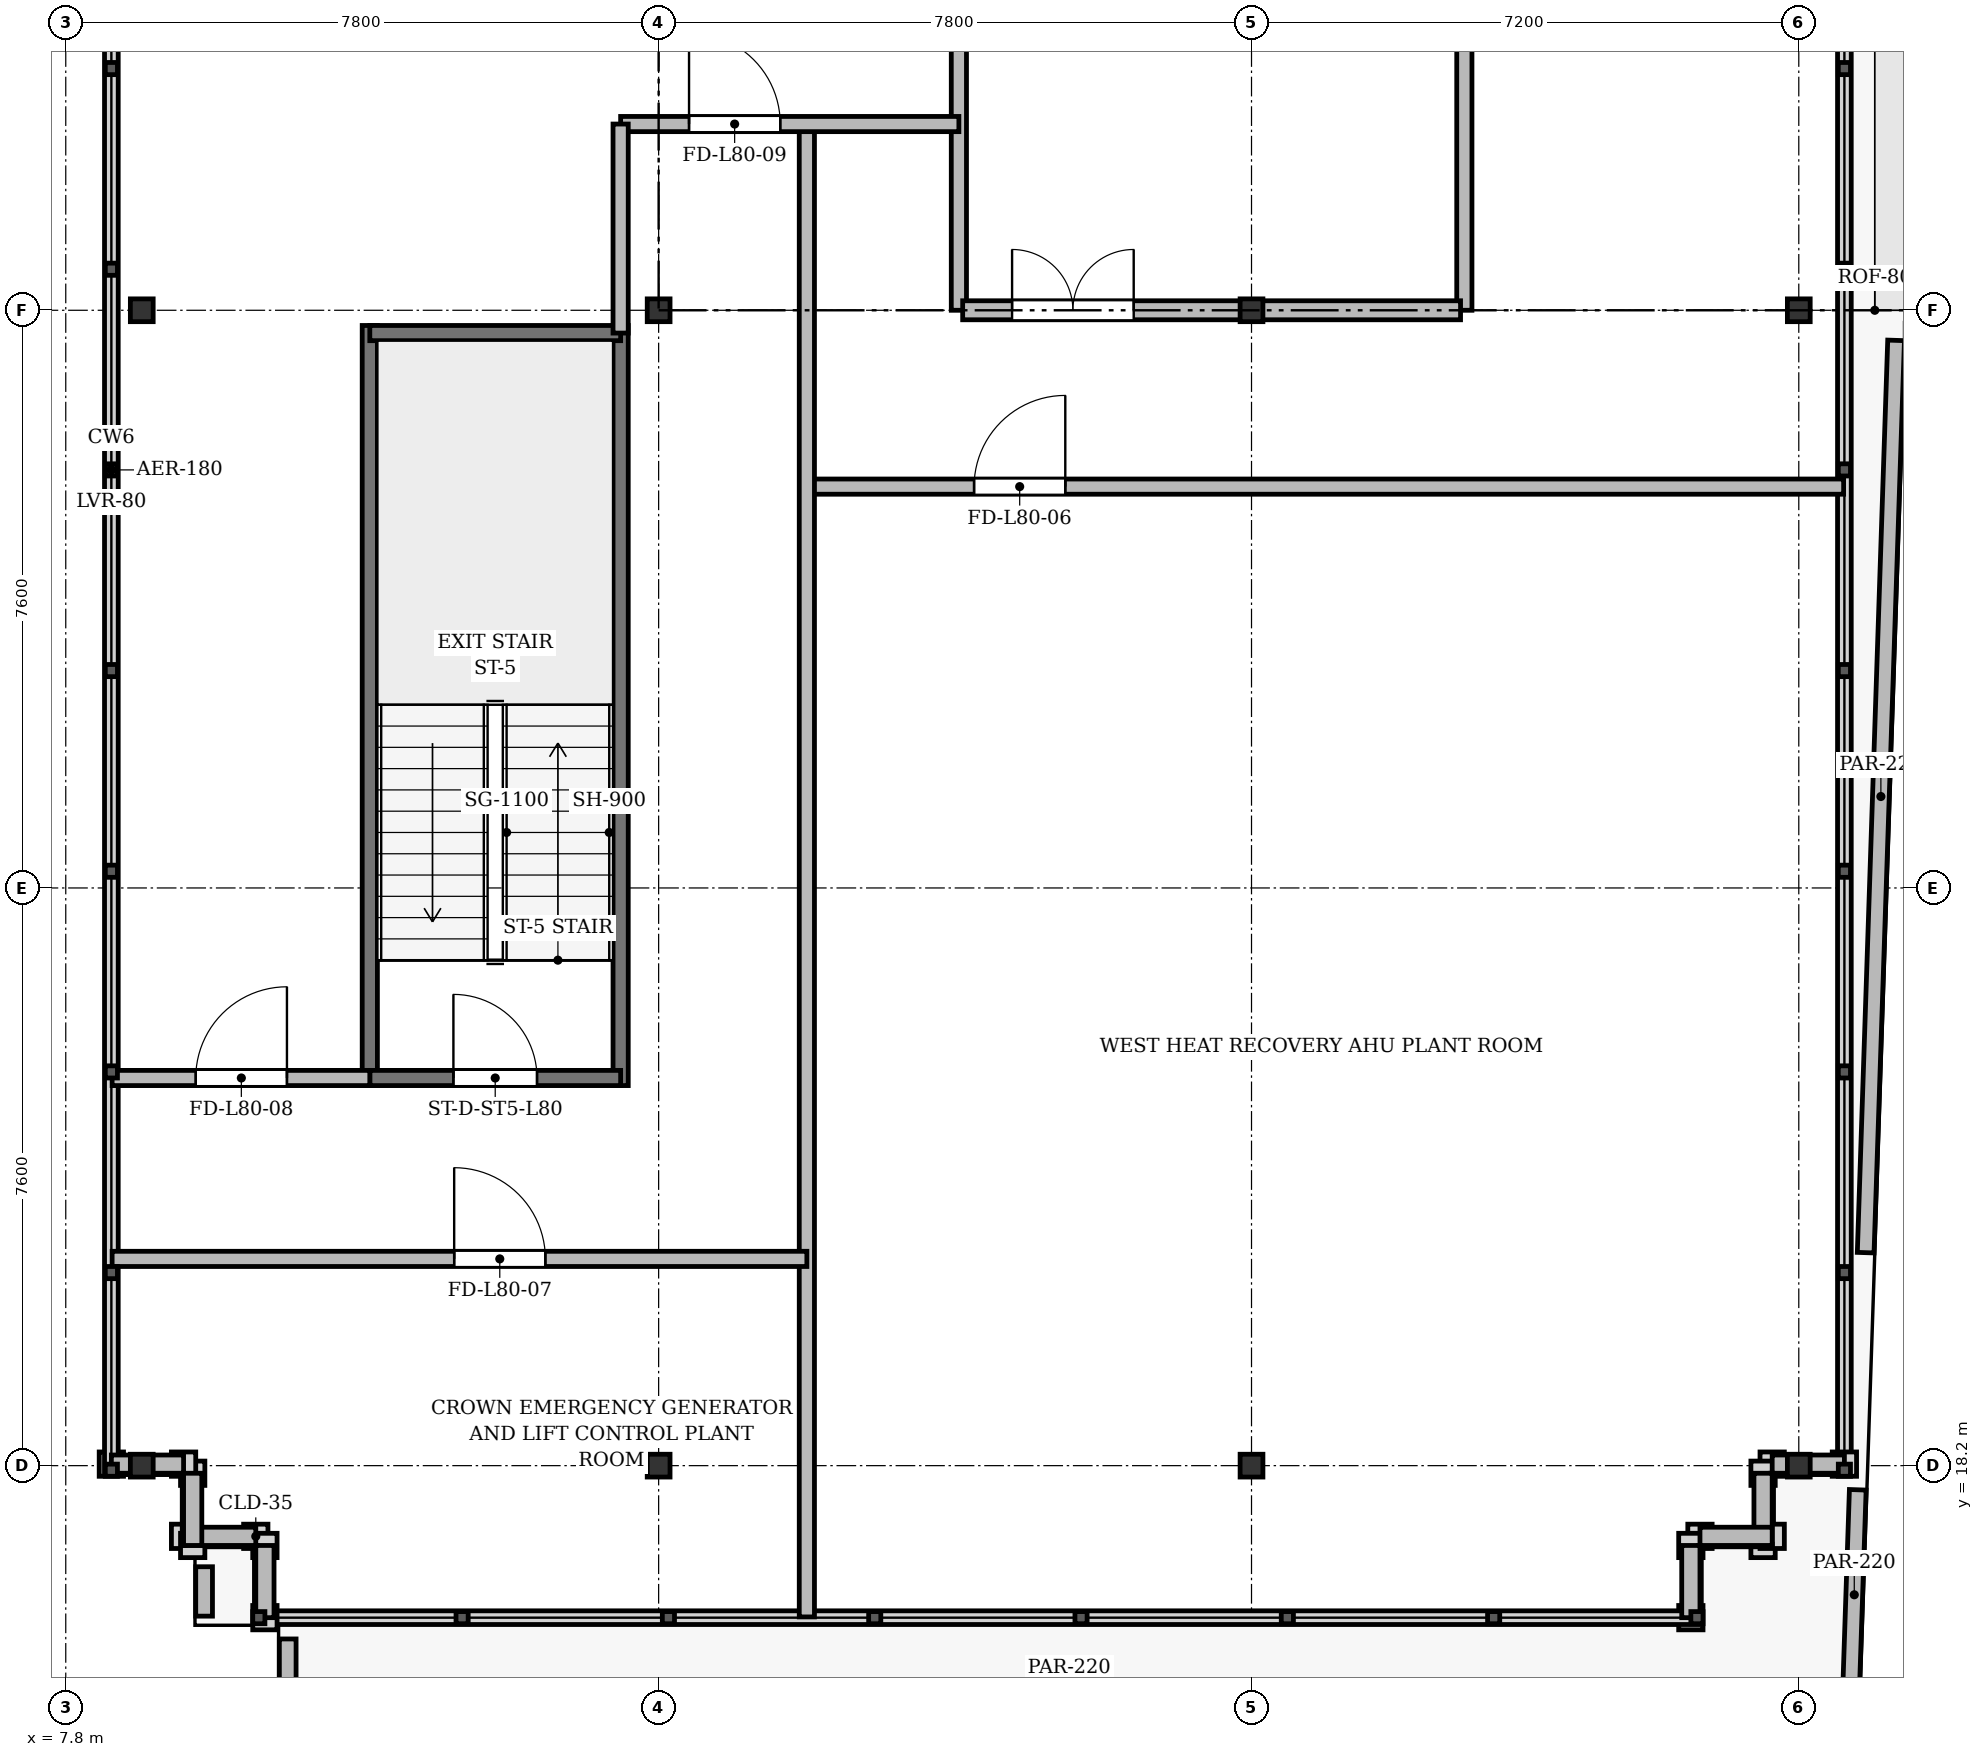
"""IFC4 building model, lengths in metres.
Left out: names, types, materials, properties, quantities, classifications, styles, units other than length and angle.
Written with IfcOpenShell. Run it as: python <this file> out.ifc"""

import sys

from ifc_helpers import new_model, si_unit, direction, frame, frame_2d, origin, origin_2d, place, context, subcontext, project, spatial, rectangle, i_section, extrude, source, transform, mapped, element, fill, save


model = new_model("IFC4")
c1 = context("Model", 3, precision=1e-05, world=origin(), true_north=direction((0.0, 1.0)))
c2 = subcontext(c1, "Body", "Model", "MODEL_VIEW")
j1 = project(units=[si_unit("LENGTHUNIT", "METRE"), si_unit("PLANEANGLEUNIT", "RADIAN")], contexts=[c1])
p1 = place(None, origin())
s1 = spatial("IfcSite", under=j1, at=p1, CompositionType="ELEMENT")
p2 = place(p1, origin())
s2 = spatial("IfcBuilding", under=s1, at=p2, CompositionType="ELEMENT")
p3 = place(p2, frame((0.0, 0.0, 307.9)))
s3 = spatial("IfcBuildingStorey", under=s2, at=p3, CompositionType="ELEMENT", Elevation=307.9)
m1 = source(origin(), c2, "Body", "SweptSolid", [
    extrude(i_section(OverallWidth=0.3, OverallDepth=0.3, WebThickness=0.015, FlangeThickness=0.024, at=origin_2d()), origin(), (0.0, 0.0, 1.0), 4.4),
])
for number, where, z_axis, x_axis in (
    (1, (8.8, 18.2, 0.0), (0.0, 0.0, 1.0), (1.0, 0.0, 0.0)),
    (2, (8.8, 33.4, 0.0), (0.0, 0.0, 1.0), (1.0, 0.0, 0.0)),
    (3, (15.6, 18.2, 0.0), (0.0, 0.0, 1.0), (1.0, 0.0, 0.0)),
    (4, (15.6, 33.4, 0.0), (0.0, 0.0, 1.0), (1.0, 0.0, 0.0)),
    (5, (23.4, 18.2, 0.0), (0.0, 0.0, 1.0), (1.0, 0.0, 0.0)),
    (6, (23.4, 33.4, 0.0), (0.0, 0.0, 1.0), (1.0, 0.0, 0.0)),
    (7, (30.6, 18.2, 0.0), (0.0, 0.0, 1.0), (1.0, 0.0, 0.0)),
    (8, (30.6, 33.4, 0.0), (0.0, 0.0, 1.0), (1.0, 0.0, 0.0)),
):
    element("IfcColumn", number, at=place(p3, frame(where, z_axis=z_axis, x_axis=x_axis)), inside=s3, PredefinedType="COLUMN", context=c2, shape_type="MappedRepresentation", body=[
        mapped(m1, transform((0.0, 0.0, 0.0), x_axis=(1.0, 0.0, 0.0), y_axis=(0.0, 1.0, 0.0), z_axis=(0.0, 0.0, 1.0), scale=1.0)),
    ])
p4 = place(p3, frame((10.3, 17.27, 0.0), z_axis=(0.0, 0.0, 1.0), x_axis=(-1.0, 0.0, 0.0)))
e9 = element("IfcWall", 9, at=p4, inside=s3, PredefinedType="SOLIDWALL", context=c2, shape_type="SweptSolid", body=[
    extrude(rectangle(XDim=0.95, YDim=0.24, at=frame_2d((0.475, 0.0))), origin(), (0.0, 0.0, 1.0), 4.1),
])
p5 = place(p3, frame((9.47, 17.15, 0.0), z_axis=(0.0, 0.0, 1.0), x_axis=(0.0, 1.0, 0.0)))
e10 = element("IfcWall", 10, at=p5, inside=s3, PredefinedType="SOLIDWALL", context=c2, shape_type="SweptSolid", body=[
    extrude(rectangle(XDim=0.95, YDim=0.24, at=frame_2d((0.475, 0.0))), origin(), (0.0, 0.0, 1.0), 4.1),
])
p6 = place(p3, frame((9.35, 18.22, 0.0), z_axis=(0.0, 0.0, 1.0), x_axis=(-1.0, 0.0, 0.0)))
e11 = element("IfcWall", 11, at=p6, inside=s3, PredefinedType="SOLIDWALL", context=c2, shape_type="SweptSolid", body=[
    extrude(rectangle(XDim=0.95, YDim=0.24, at=frame_2d((0.475, 0.0))), origin(), (0.0, 0.0, 1.0), 3.6),
])
p7 = place(p3, frame((31.2, 18.22, 0.0), z_axis=(0.0, 0.0, 1.0), x_axis=(-1.0, 0.0, 0.0)))
e12 = element("IfcWall", 12, at=p7, inside=s3, PredefinedType="SOLIDWALL", context=c2, shape_type="SweptSolid", body=[
    extrude(rectangle(XDim=0.95, YDim=0.24, at=frame_2d((0.475, 0.0))), origin(), (0.0, 0.0, 1.0), 4.1),
])
p8 = place(p3, frame((30.13, 18.1, 0.0), z_axis=(0.0, 0.0, 1.0), x_axis=(0.0, -1.0, 0.0)))
e13 = element("IfcWall", 13, at=p8, inside=s3, PredefinedType="SOLIDWALL", context=c2, shape_type="SweptSolid", body=[
    extrude(rectangle(XDim=0.95, YDim=0.24, at=frame_2d((0.475, 0.0))), origin(), (0.0, 0.0, 1.0), 4.1),
])
for number, where, z_axis, x_axis in (
    (14, (30.25, 17.27, 0.0), (0.0, 0.0, 1.0), (-1.0, 0.0, 0.0)),
    (15, (29.18, 17.15, 0.0), (0.0, 0.0, 1.0), (0.0, -1.0, 0.0)),
    (16, (10.42, 16.2, 0.0), (0.0, 0.0, 1.0), (0.0, 1.0, 0.0)),
):
    element("IfcWall", number, at=place(p3, frame(where, z_axis=z_axis, x_axis=x_axis)), inside=s3, PredefinedType="SOLIDWALL", context=c2, shape_type="SweptSolid", body=[
        extrude(rectangle(XDim=0.95, YDim=0.24, at=frame_2d((0.475, 0.0))), origin(), (0.0, 0.0, 1.0), 4.1),
    ])
p9 = place(p3, frame((9.62, 16.22, 0.0), z_axis=(0.0, 0.0, 1.0), x_axis=(0.0, 1.0, 0.0)))
e17 = element("IfcWall", 17, at=p9, inside=s3, PredefinedType="PARAPET", context=c2, shape_type="SweptSolid", body=[
    extrude(rectangle(XDim=0.65, YDim=0.22, at=frame_2d((0.325, 0.0))), origin(), (0.0, 0.0, 1.0), 1.08),
])
p10 = place(p3, frame((31.88, 33.004, 0.0), z_axis=(0.0, 0.0, 1.0), x_axis=(-0.033321599525, -0.999444681313, 0.0)))
e18 = element("IfcWall", 18, at=p10, inside=s3, PredefinedType="PARAPET", context=c2, shape_type="SweptSolid", body=[
    extrude(rectangle(XDim=12.009, YDim=0.22, at=frame_2d((6.004, 0.0))), origin(), (0.0, 0.0, 1.0), 1.08),
])
p11 = place(p3, frame((31.376, 17.882, 0.0), z_axis=(0.0, 0.0, 1.0), x_axis=(-0.03330306503, -0.999445299083, 0.0)))
e19 = element("IfcWall", 19, at=p11, inside=s3, PredefinedType="PARAPET", context=c2, shape_type="SweptSolid", body=[
    extrude(rectangle(XDim=2.764, YDim=0.22, at=frame_2d((1.382, 0.0))), origin(), (0.0, 0.0, 1.0), 1.08),
])
p12 = place(p3, frame((10.72, 15.12, 0.0), z_axis=(0.0, 0.0, 1.0), x_axis=(0.0, 1.0, 0.0)))
e20 = element("IfcWall", 20, at=p12, inside=s3, PredefinedType="PARAPET", context=c2, shape_type="SweptSolid", body=[
    extrude(rectangle(XDim=0.8, YDim=0.22, at=frame_2d((0.4, 0.0))), origin(), (0.0, 0.0, 1.0), 1.08),
])
for number, where, z_axis, x_axis in (
    (21, (11.8, 23.2, 0.0), (0.0, 0.0, 1.0), (0.0, 1.0, 0.0)),
    (22, (15.1, 23.2, 0.0), (0.0, 0.0, 1.0), (0.0, 1.0, 0.0)),
):
    element("IfcWall", number, at=place(p3, frame(where, z_axis=z_axis, x_axis=x_axis)), inside=s3, PredefinedType="SHEAR", context=c2, shape_type="SweptSolid", body=[
        extrude(rectangle(XDim=10.0, YDim=0.2, at=frame_2d((5.0, 0.0))), origin(), (0.0, 0.0, 1.0), 4.1),
    ])
p13 = place(p3, frame((11.8, 33.1, 0.0), z_axis=(0.0, 0.0, 1.0), x_axis=(1.0, 0.0, 0.0)))
e23 = element("IfcWall", 23, at=p13, inside=s3, PredefinedType="SHEAR", context=c2, shape_type="SweptSolid", body=[
    extrude(rectangle(XDim=3.3, YDim=0.2, at=frame_2d((1.65, 0.0))), origin(), (0.0, 0.0, 1.0), 4.1),
])
p14 = place(p3, frame((11.8, 23.3, 0.0), z_axis=(0.0, 0.0, 1.0), x_axis=(1.0, 0.0, 0.0)))
e24 = element("IfcWall", 24, at=p14, inside=s3, PredefinedType="SHEAR", context=c2, shape_type="SweptSolid", body=[
    extrude(rectangle(XDim=3.3, YDim=0.2, at=frame_2d((1.65, 0.0))), origin(), (0.0, 0.0, 1.0), 4.1),
])
p15 = place(p14, frame((1.1, 0.0, 0.0)))
e25 = element("IfcOpeningElement", 25, at=p15, cuts=e24, PredefinedType="OPENING", context=c2, shape_type="SweptSolid", body=[
    extrude(rectangle(XDim=1.1, YDim=2.15, at=frame_2d((0.55, 1.075))), frame((0.0, 0.11, 0.0), z_axis=(0.0, -1.0, 0.0), x_axis=(1.0, 0.0, 0.0)), (0.0, 0.0, 1.0), 0.22),
])
p16 = place(p3, frame((19.55, 33.4, 0.0), z_axis=(0.0, 0.0, 1.0), x_axis=(0.0, 1.0, 0.0)))
e26 = element("IfcWall", 26, at=p16, inside=s3, PredefinedType="PARTITIONING", context=c2, shape_type="SweptSolid", body=[
    extrude(rectangle(XDim=11.3, YDim=0.2, at=frame_2d((5.65, 0.0))), origin(), (0.0, 0.0, 1.0), 3.6),
])
p17 = place(p3, frame((26.2, 33.4, 0.0), z_axis=(0.0, 0.0, 1.0), x_axis=(0.0, 1.0, 0.0)))
e27 = element("IfcWall", 27, at=p17, inside=s3, PredefinedType="SOLIDWALL", context=c2, shape_type="SweptSolid", body=[
    extrude(rectangle(XDim=11.3, YDim=0.2, at=frame_2d((5.65, 0.0))), origin(), (0.0, 0.0, 1.0), 3.6),
])
p18 = place(p3, frame((19.6, 33.4, 0.0), z_axis=(0.0, 0.0, 1.0), x_axis=(1.0, 0.0, 0.0)))
e28 = element("IfcWall", 28, at=p18, inside=s3, PredefinedType="PARTITIONING", context=c2, shape_type="SweptSolid", body=[
    extrude(rectangle(XDim=6.55, YDim=0.25, at=frame_2d((3.275, 0.0))), origin(), (0.0, 0.0, 1.0), 3.6),
])
p19 = place(p18, frame((0.65, 0.0, 0.0)))
e29 = element("IfcOpeningElement", 29, at=p19, cuts=e28, PredefinedType="OPENING", context=c2, shape_type="SweptSolid", body=[
    extrude(rectangle(XDim=1.6, YDim=2.2, at=frame_2d((0.8, 1.1))), frame((0.0, 0.135, 0.0), z_axis=(0.0, -1.0, 0.0), x_axis=(1.0, 0.0, 0.0)), (0.0, 0.0, 1.0), 0.27),
])
p20 = place(p3, frame((17.55, 31.08, 0.0), z_axis=(0.0, 0.0, 1.0), x_axis=(1.0, 0.0, 0.0)))
e30 = element("IfcWall", 30, at=p20, inside=s3, PredefinedType="PARTITIONING", context=c2, shape_type="SweptSolid", body=[
    extrude(rectangle(XDim=13.64, YDim=0.2, at=frame_2d((6.82, 0.0))), origin(), (0.0, 0.0, 1.0), 3.6),
])
p21 = place(p20, frame((2.2, 0.0, 0.0)))
e31 = element("IfcOpeningElement", 31, at=p21, cuts=e30, PredefinedType="OPENING", context=c2, shape_type="SweptSolid", body=[
    extrude(rectangle(XDim=1.2, YDim=2.15, at=frame_2d((0.6, 1.075))), frame((0.0, 0.11, 0.0), z_axis=(0.0, -1.0, 0.0), x_axis=(1.0, 0.0, 0.0)), (0.0, 0.0, 1.0), 0.22),
])
p22 = place(p3, frame((17.55, 16.21, 0.0), z_axis=(0.0, 0.0, 1.0), x_axis=(0.0, 1.0, 0.0)))
e32 = element("IfcWall", 32, at=p22, inside=s3, PredefinedType="PARTITIONING", context=c2, shape_type="SweptSolid", body=[
    extrude(rectangle(XDim=19.64, YDim=0.2, at=frame_2d((9.82, 0.0))), origin(), (0.0, 0.0, 1.0), 3.6),
])
p23 = place(p3, frame((8.41, 20.92, 0.0), z_axis=(0.0, 0.0, 1.0), x_axis=(1.0, 0.0, 0.0)))
e33 = element("IfcWall", 33, at=p23, inside=s3, PredefinedType="PARTITIONING", context=c2, shape_type="SweptSolid", body=[
    extrude(rectangle(XDim=9.14, YDim=0.2, at=frame_2d((4.57, 0.0))), origin(), (0.0, 0.0, 1.0), 3.6),
])
p24 = place(p23, frame((4.5, 0.0, 0.0)))
e34 = element("IfcOpeningElement", 34, at=p24, cuts=e33, PredefinedType="OPENING", context=c2, shape_type="SweptSolid", body=[
    extrude(rectangle(XDim=1.2, YDim=2.15, at=frame_2d((0.6, 1.075))), frame((0.0, 0.11, 0.0), z_axis=(0.0, -1.0, 0.0), x_axis=(1.0, 0.0, 0.0)), (0.0, 0.0, 1.0), 0.22),
])
p25 = place(p3, frame((8.41, 23.3, 0.0), z_axis=(0.0, 0.0, 1.0), x_axis=(1.0, 0.0, 0.0)))
e35 = element("IfcWall", 35, at=p25, inside=s3, PredefinedType="PARTITIONING", context=c2, shape_type="SweptSolid", body=[
    extrude(rectangle(XDim=3.39, YDim=0.2, at=frame_2d((1.695, 0.0))), origin(), (0.0, 0.0, 1.0), 3.6),
])
p26 = place(p25, frame((1.1, 0.0, 0.0)))
e36 = element("IfcOpeningElement", 36, at=p26, cuts=e35, PredefinedType="OPENING", context=c2, shape_type="SweptSolid", body=[
    extrude(rectangle(XDim=1.2, YDim=2.15, at=frame_2d((0.6, 1.075))), frame((0.0, 0.11, 0.0), z_axis=(0.0, -1.0, 0.0), x_axis=(1.0, 0.0, 0.0)), (0.0, 0.0, 1.0), 0.22),
])
p27 = place(p3, frame((15.1, 35.85, 0.0), z_axis=(0.0, 0.0, 1.0), x_axis=(1.0, 0.0, 0.0)))
e37 = element("IfcWall", 37, at=p27, inside=s3, PredefinedType="PARTITIONING", context=c2, shape_type="SweptSolid", body=[
    extrude(rectangle(XDim=4.45, YDim=0.2, at=frame_2d((2.225, 0.0))), origin(), (0.0, 0.0, 1.0), 3.6),
])
p28 = place(p27, frame((0.9, 0.0, 0.0)))
e38 = element("IfcOpeningElement", 38, at=p28, cuts=e37, PredefinedType="OPENING", context=c2, shape_type="SweptSolid", body=[
    extrude(rectangle(XDim=1.2, YDim=2.15, at=frame_2d((0.6, 1.075))), frame((0.0, 0.11, 0.0), z_axis=(0.0, -1.0, 0.0), x_axis=(1.0, 0.0, 0.0)), (0.0, 0.0, 1.0), 0.22),
])
p29 = place(p3, frame((15.1, 33.1, 0.0), z_axis=(0.0, 0.0, 1.0), x_axis=(0.0, 1.0, 0.0)))
e39 = element("IfcWall", 39, at=p29, inside=s3, PredefinedType="PARTITIONING", context=c2, shape_type="SweptSolid", body=[
    extrude(rectangle(XDim=2.75, YDim=0.2, at=frame_2d((1.375, 0.0))), origin(), (0.0, 0.0, 1.0), 3.6),
])
m2 = source(origin(), c2, "Body", "SweptSolid", [
    extrude(rectangle(XDim=1.1, YDim=2.15, at=frame_2d((0.55, 1.075))), frame((0.0, 0.025, 0.0), z_axis=(0.0, -1.0, 0.0), x_axis=(1.0, 0.0, 0.0)), (0.0, 0.0, 1.0), 0.05),
])
p30 = place(p15, origin())
e40 = element("IfcDoor", 40, at=p30, inside=s3, OperationType="SINGLE_SWING_LEFT", PredefinedType="DOOR", context=c2, shape_type="MappedRepresentation", body=[
    mapped(m2, transform((0.0, 0.0, 0.0), x_axis=(1.0, 0.0, 0.0), y_axis=(0.0, 1.0, 0.0), z_axis=(0.0, 0.0, 1.0), scale=1.0)),
])
fill(e25, e40)
m3 = source(origin(), c2, "Body", "SweptSolid", [
    extrude(rectangle(XDim=1.6, YDim=2.2, at=frame_2d((0.8, 1.1))), frame((0.0, 0.025, 0.0), z_axis=(0.0, -1.0, 0.0), x_axis=(1.0, 0.0, 0.0)), (0.0, 0.0, 1.0), 0.05),
])
p31 = place(p19, origin())
e41 = element("IfcDoor", 41, at=p31, inside=s3, OperationType="DOUBLE_DOOR_SINGLE_SWING", PredefinedType="DOOR", context=c2, shape_type="MappedRepresentation", body=[
    mapped(m3, transform((0.0, 0.0, 0.0), x_axis=(1.0, 0.0, 0.0), y_axis=(0.0, 1.0, 0.0), z_axis=(0.0, 0.0, 1.0), scale=1.0)),
])
fill(e29, e41)
m4 = source(origin(), c2, "Body", "SweptSolid", [
    extrude(rectangle(XDim=1.2, YDim=2.15, at=frame_2d((0.6, 1.075))), frame((0.0, 0.025, 0.0), z_axis=(0.0, -1.0, 0.0), x_axis=(1.0, 0.0, 0.0)), (0.0, 0.0, 1.0), 0.05),
])
p32 = place(p21, origin())
e42 = element("IfcDoor", 42, at=p32, inside=s3, OperationType="SINGLE_SWING_RIGHT", PredefinedType="DOOR", context=c2, shape_type="MappedRepresentation", body=[
    mapped(m4, transform((0.0, 0.0, 0.0), x_axis=(1.0, 0.0, 0.0), y_axis=(0.0, 1.0, 0.0), z_axis=(0.0, 0.0, 1.0), scale=1.0)),
])
fill(e31, e42)
p33 = place(p24, origin())
e43 = element("IfcDoor", 43, at=p33, inside=s3, OperationType="SINGLE_SWING_LEFT", PredefinedType="DOOR", context=c2, shape_type="MappedRepresentation", body=[
    mapped(m4, transform((0.0, 0.0, 0.0), x_axis=(1.0, 0.0, 0.0), y_axis=(0.0, 1.0, 0.0), z_axis=(0.0, 0.0, 1.0), scale=1.0)),
])
fill(e34, e43)
p34 = place(p26, origin())
e44 = element("IfcDoor", 44, at=p34, inside=s3, OperationType="SINGLE_SWING_RIGHT", PredefinedType="DOOR", context=c2, shape_type="MappedRepresentation", body=[
    mapped(m4, transform((0.0, 0.0, 0.0), x_axis=(1.0, 0.0, 0.0), y_axis=(0.0, 1.0, 0.0), z_axis=(0.0, 0.0, 1.0), scale=1.0)),
])
fill(e36, e44)
p35 = place(p28, origin())
e45 = element("IfcDoor", 45, at=p35, inside=s3, OperationType="SINGLE_SWING_LEFT", PredefinedType="DOOR", context=c2, shape_type="MappedRepresentation", body=[
    mapped(m4, transform((0.0, 0.0, 0.0), x_axis=(1.0, 0.0, 0.0), y_axis=(0.0, 1.0, 0.0), z_axis=(0.0, 0.0, 1.0), scale=1.0)),
])
fill(e38, e45)
save(model, sys.argv[1])
